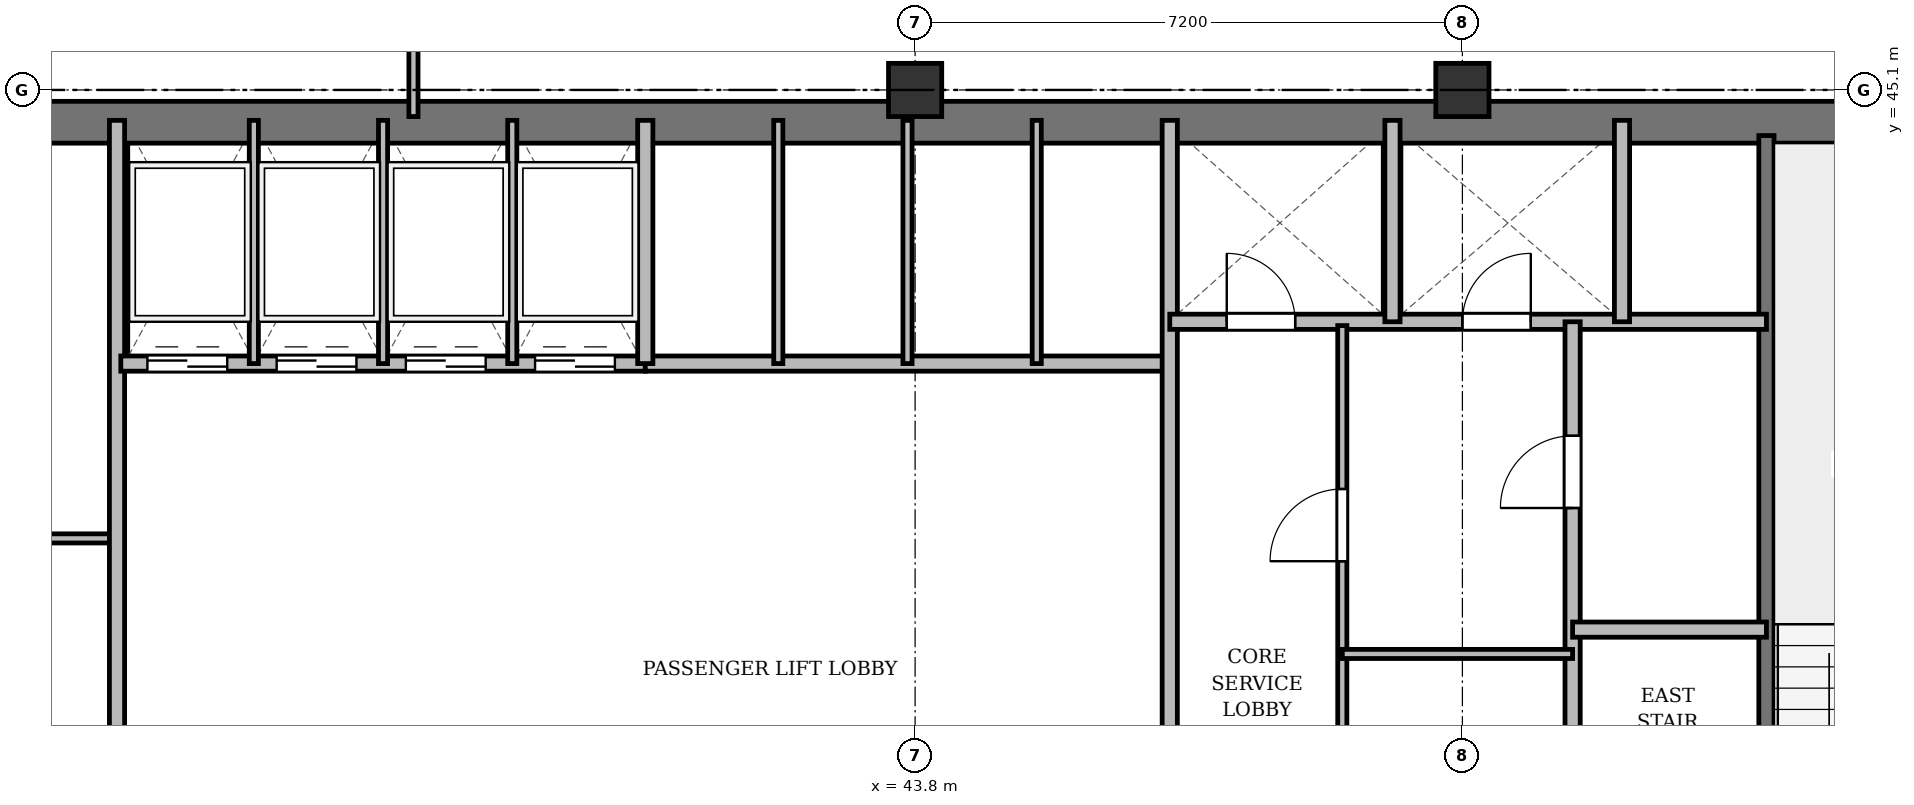
"""IFC4 building model, lengths in metres.
Left out: names, types, materials, properties, quantities, classifications, styles, units other than length and angle.
Written with IfcOpenShell. Run it as: python <this file> out.ifc"""

import sys

from ifc_helpers import new_model, si_unit, direction, frame, frame_2d, origin, origin_2d, place, context, subcontext, project, spatial, rectangle, extrude, source, transform, mapped, element, fill, save


model = new_model("IFC4")
c1 = context("Model", 3, precision=1e-05, world=origin(), true_north=direction((0.0, 1.0)))
c2 = subcontext(c1, "Body", "Model", "MODEL_VIEW")
j1 = project(units=[si_unit("LENGTHUNIT", "METRE"), si_unit("PLANEANGLEUNIT", "RADIAN")], contexts=[c1])
p1 = place(None, origin())
s1 = spatial("IfcSite", under=j1, at=p1, CompositionType="ELEMENT")
p2 = place(p1, origin())
s2 = spatial("IfcBuilding", under=s1, at=p2, CompositionType="ELEMENT")
p3 = place(p2, frame((0.0, 0.0, 160.9)))
s3 = spatial("IfcBuildingStorey", under=s2, at=p3, CompositionType="ELEMENT", Elevation=160.9)
m1 = source(origin(), c2, "Body", "SweptSolid", [
    extrude(rectangle(XDim=0.7, YDim=0.7, at=origin_2d()), origin(), (0.0, 0.0, 1.0), 3.6),
])
for number, where, z_axis, x_axis in (
    (1, (43.8, 45.1, 0.0), (0.0, 0.0, 1.0), (1.0, 0.0, 0.0)),
    (2, (51.0, 45.1, 0.0), (0.0, 0.0, 1.0), (1.0, 0.0, 0.0)),
):
    element("IfcColumn", number, at=place(p3, frame(where, z_axis=z_axis, x_axis=x_axis)), inside=s3, PredefinedType="COLUMN", context=c2, shape_type="MappedRepresentation", body=[
        mapped(m1, transform((0.0, 0.0, 0.0), x_axis=(1.0, 0.0, 0.0), y_axis=(0.0, 1.0, 0.0), z_axis=(0.0, 0.0, 1.0), scale=1.0)),
    ])
p4 = place(p3, frame((15.65, 44.675, 0.0), z_axis=(0.0, 0.0, 1.0), x_axis=(1.0, 0.0, 0.0)))
e3 = element("IfcWall", 3, at=p4, inside=s3, PredefinedType="SHEAR", context=c2, shape_type="SweptSolid", body=[
    extrude(rectangle(XDim=43.1, YDim=0.55, at=frame_2d((21.55, 0.0))), origin(), (0.0, 0.0, 1.0), 3.35),
])
p5 = place(p3, frame((55.0, 33.4, 0.0), z_axis=(0.0, 0.0, 1.0), x_axis=(0.0, 1.0, 0.0)))
e4 = element("IfcWall", 4, at=p5, inside=s3, PredefinedType="SHEAR", context=c2, shape_type="SweptSolid", body=[
    extrude(rectangle(XDim=11.1, YDim=0.2, at=frame_2d((5.55, 0.0))), origin(), (0.0, 0.0, 1.0), 3.35),
])
p6 = place(p5, frame((0.85, 0.0, 0.0)))
e5 = element("IfcOpeningElement", 5, at=p6, cuts=e4, PredefinedType="OPENING", context=c2, shape_type="SweptSolid", body=[
    extrude(rectangle(XDim=1.1, YDim=2.15, at=frame_2d((0.55, 1.075))), frame((0.0, 0.11, 0.0), z_axis=(0.0, -1.0, 0.0), x_axis=(1.0, 0.0, 0.0)), (0.0, 0.0, 1.0), 0.22),
])
p7 = place(p3, frame((26.3, 39.2, 0.0), z_axis=(0.0, 0.0, 1.0), x_axis=(1.0, 0.0, 0.0)))
e6 = element("IfcWall", 6, at=p7, inside=s3, PredefinedType="PARTITIONING", context=c2, shape_type="SweptSolid", body=[
    extrude(rectangle(XDim=7.0, YDim=0.12, at=frame_2d((3.5, 0.0))), origin(), (0.0, 0.0, 1.0), 2.85),
])
p8 = place(p7, frame((2.6, 0.0, 0.0)))
e7 = element("IfcOpeningElement", 7, at=p8, cuts=e6, PredefinedType="OPENING", context=c2, shape_type="SweptSolid", body=[
    extrude(rectangle(XDim=0.95, YDim=2.15, at=frame_2d((0.475, 1.075))), frame((0.0, 0.07, 0.0), z_axis=(0.0, -1.0, 0.0), x_axis=(1.0, 0.0, 0.0)), (0.0, 0.0, 1.0), 0.14),
])
p9 = place(p3, frame((33.3, 33.4, 0.0), z_axis=(0.0, 0.0, 1.0), x_axis=(0.0, 1.0, 0.0)))
e8 = element("IfcWall", 8, at=p9, inside=s3, PredefinedType="SOLIDWALL", context=c2, shape_type="SweptSolid", body=[
    extrude(rectangle(XDim=11.3, YDim=0.2, at=frame_2d((5.65, 0.0))), origin(), (0.0, 0.0, 1.0), 2.75),
])
p10 = place(p3, frame((33.35, 41.5, 0.0), z_axis=(0.0, 0.0, 1.0), x_axis=(1.0, 0.0, 0.0)))
e9 = element("IfcWall", 9, at=p10, inside=s3, PredefinedType="SOLIDWALL", context=c2, shape_type="SweptSolid", body=[
    extrude(rectangle(XDim=6.9, YDim=0.2, at=frame_2d((3.45, 0.0))), origin(), (0.0, 0.0, 1.0), 3.35),
])
p11 = place(p10, frame((0.35, 0.0, 0.0)))
e10 = element("IfcOpeningElement", 10, at=p11, cuts=e9, PredefinedType="OPENING", context=c2, shape_type="SweptSolid", body=[
    extrude(rectangle(XDim=1.05, YDim=2.15, at=frame_2d((0.525, 1.075))), frame((0.0, 0.11, 0.0), z_axis=(0.0, -1.0, 0.0), x_axis=(1.0, 0.0, 0.0)), (0.0, 0.0, 1.0), 0.22),
])
p12 = place(p10, frame((2.05, 0.0, 0.0)))
e11 = element("IfcOpeningElement", 11, at=p12, cuts=e9, PredefinedType="OPENING", context=c2, shape_type="SweptSolid", body=[
    extrude(rectangle(XDim=1.05, YDim=2.15, at=frame_2d((0.525, 1.075))), frame((0.0, 0.11, 0.0), z_axis=(0.0, -1.0, 0.0), x_axis=(1.0, 0.0, 0.0)), (0.0, 0.0, 1.0), 0.22),
])
p13 = place(p10, frame((3.75, 0.0, 0.0)))
e12 = element("IfcOpeningElement", 12, at=p13, cuts=e9, PredefinedType="OPENING", context=c2, shape_type="SweptSolid", body=[
    extrude(rectangle(XDim=1.05, YDim=2.15, at=frame_2d((0.525, 1.075))), frame((0.0, 0.11, 0.0), z_axis=(0.0, -1.0, 0.0), x_axis=(1.0, 0.0, 0.0)), (0.0, 0.0, 1.0), 0.22),
])
p14 = place(p10, frame((5.45, 0.0, 0.0)))
e13 = element("IfcOpeningElement", 13, at=p14, cuts=e9, PredefinedType="OPENING", context=c2, shape_type="SweptSolid", body=[
    extrude(rectangle(XDim=1.05, YDim=2.15, at=frame_2d((0.525, 1.075))), frame((0.0, 0.11, 0.0), z_axis=(0.0, -1.0, 0.0), x_axis=(1.0, 0.0, 0.0)), (0.0, 0.0, 1.0), 0.22),
])
for number, where, z_axis, x_axis in (
    (14, (35.1, 41.5, 0.0), (0.0, 0.0, 1.0), (0.0, 1.0, 0.0)),
    (15, (36.8, 41.5, 0.0), (0.0, 0.0, 1.0), (0.0, 1.0, 0.0)),
    (16, (38.5, 41.5, 0.0), (0.0, 0.0, 1.0), (0.0, 1.0, 0.0)),
):
    element("IfcWall", number, at=place(p3, frame(where, z_axis=z_axis, x_axis=x_axis)), inside=s3, PredefinedType="PARTITIONING", context=c2, shape_type="SweptSolid", body=[
        extrude(rectangle(XDim=3.2, YDim=0.12, at=frame_2d((1.6, 0.0))), origin(), (0.0, 0.0, 1.0), 3.35),
    ])
p15 = place(p3, frame((40.25, 41.5, 0.0), z_axis=(0.0, 0.0, 1.0), x_axis=(1.0, 0.0, 0.0)))
e17 = element("IfcWall", 17, at=p15, inside=s3, PredefinedType="SOLIDWALL", context=c2, shape_type="SweptSolid", body=[
    extrude(rectangle(XDim=6.9, YDim=0.2, at=frame_2d((3.45, 0.0))), origin(), (0.0, 0.0, 1.0), 2.85),
])
p16 = place(p3, frame((40.25, 41.5, 0.0), z_axis=(0.0, 0.0, 1.0), x_axis=(0.0, 1.0, 0.0)))
e18 = element("IfcWall", 18, at=p16, inside=s3, PredefinedType="SOLIDWALL", context=c2, shape_type="SweptSolid", body=[
    extrude(rectangle(XDim=3.2, YDim=0.2, at=frame_2d((1.6, 0.0))), origin(), (0.0, 0.0, 1.0), 3.35),
])
p17 = place(p3, frame((42.0, 41.5, 0.0), z_axis=(0.0, 0.0, 1.0), x_axis=(0.0, 1.0, 0.0)))
e19 = element("IfcWall", 19, at=p17, inside=s3, PredefinedType="PARTITIONING", context=c2, shape_type="SweptSolid", body=[
    extrude(rectangle(XDim=3.2, YDim=0.12, at=frame_2d((1.6, 0.0))), origin(), (0.0, 0.0, 1.0), 3.35),
])
p18 = place(p3, frame((43.7, 41.5, 0.0), z_axis=(0.0, 0.0, 1.0), x_axis=(0.0, 1.0, 0.0)))
e20 = element("IfcWall", 20, at=p18, inside=s3, PredefinedType="PARTITIONING", context=c2, shape_type="SweptSolid", body=[
    extrude(rectangle(XDim=3.2, YDim=0.12, at=frame_2d((1.6, 0.0))), origin(), (0.0, 0.0, 1.0), 2.85),
])
p19 = place(p3, frame((45.4, 41.5, 0.0), z_axis=(0.0, 0.0, 1.0), x_axis=(0.0, 1.0, 0.0)))
e21 = element("IfcWall", 21, at=p19, inside=s3, PredefinedType="PARTITIONING", context=c2, shape_type="SweptSolid", body=[
    extrude(rectangle(XDim=3.2, YDim=0.12, at=frame_2d((1.6, 0.0))), origin(), (0.0, 0.0, 1.0), 3.35),
])
p20 = place(p3, frame((47.15, 33.4, 0.0), z_axis=(0.0, 0.0, 1.0), x_axis=(0.0, 1.0, 0.0)))
e22 = element("IfcWall", 22, at=p20, inside=s3, PredefinedType="SOLIDWALL", context=c2, shape_type="SweptSolid", body=[
    extrude(rectangle(XDim=11.3, YDim=0.2, at=frame_2d((5.65, 0.0))), origin(), (0.0, 0.0, 1.0), 2.75),
])
p21 = place(p3, frame((47.15, 42.05, 0.0), z_axis=(0.0, 0.0, 1.0), x_axis=(1.0, 0.0, 0.0)))
e23 = element("IfcWall", 23, at=p21, inside=s3, PredefinedType="SOLIDWALL", context=c2, shape_type="SweptSolid", body=[
    extrude(rectangle(XDim=7.85, YDim=0.2, at=frame_2d((3.925, 0.0))), origin(), (0.0, 0.0, 1.0), 2.85),
])
p22 = place(p21, frame((0.75, 0.0, 0.0)))
e24 = element("IfcOpeningElement", 24, at=p22, cuts=e23, PredefinedType="OPENING", context=c2, shape_type="SweptSolid", body=[
    extrude(rectangle(XDim=0.9, YDim=2.1, at=frame_2d((0.45, 1.05))), frame((0.0, 0.11, 0.0), z_axis=(0.0, -1.0, 0.0), x_axis=(1.0, 0.0, 0.0)), (0.0, 0.0, 1.0), 0.22),
])
p23 = place(p21, frame((3.85, 0.0, 0.0)))
e25 = element("IfcOpeningElement", 25, at=p23, cuts=e23, PredefinedType="OPENING", context=c2, shape_type="SweptSolid", body=[
    extrude(rectangle(XDim=0.9, YDim=2.1, at=frame_2d((0.45, 1.05))), frame((0.0, 0.11, 0.0), z_axis=(0.0, -1.0, 0.0), x_axis=(1.0, 0.0, 0.0)), (0.0, 0.0, 1.0), 0.22),
])
for number, where, z_axis, x_axis in (
    (26, (50.08, 42.05, 0.0), (0.0, 0.0, 1.0), (0.0, 1.0, 0.0)),
    (27, (53.1, 42.05, 0.0), (0.0, 0.0, 1.0), (0.0, 1.0, 0.0)),
):
    element("IfcWall", number, at=place(p3, frame(where, z_axis=z_axis, x_axis=x_axis)), inside=s3, PredefinedType="SOLIDWALL", context=c2, shape_type="SweptSolid", body=[
        extrude(rectangle(XDim=2.65, YDim=0.2, at=frame_2d((1.325, 0.0))), origin(), (0.0, 0.0, 1.0), 3.35),
    ])
p24 = place(p3, frame((52.45, 33.4, 0.0), z_axis=(0.0, 0.0, 1.0), x_axis=(0.0, 1.0, 0.0)))
e28 = element("IfcWall", 28, at=p24, inside=s3, PredefinedType="PARTITIONING", context=c2, shape_type="SweptSolid", body=[
    extrude(rectangle(XDim=8.65, YDim=0.2, at=frame_2d((4.325, 0.0))), origin(), (0.0, 0.0, 1.0), 2.75),
])
p25 = place(p24, frame((6.2, 0.0, 0.0)))
e29 = element("IfcOpeningElement", 29, at=p25, cuts=e28, PredefinedType="OPENING", context=c2, shape_type="SweptSolid", body=[
    extrude(rectangle(XDim=0.95, YDim=2.15, at=frame_2d((0.475, 1.075))), frame((0.0, 0.11, 0.0), z_axis=(0.0, -1.0, 0.0), x_axis=(1.0, 0.0, 0.0)), (0.0, 0.0, 1.0), 0.22),
])
p26 = place(p3, frame((52.45, 38.0, 0.0), z_axis=(0.0, 0.0, 1.0), x_axis=(1.0, 0.0, 0.0)))
e30 = element("IfcWall", 30, at=p26, inside=s3, PredefinedType="PARTITIONING", context=c2, shape_type="SweptSolid", body=[
    extrude(rectangle(XDim=2.55, YDim=0.2, at=frame_2d((1.275, 0.0))), origin(), (0.0, 0.0, 1.0), 3.35),
])
p27 = place(p3, frame((49.42, 33.4, 0.0), z_axis=(0.0, 0.0, 1.0), x_axis=(0.0, 1.0, 0.0)))
e31 = element("IfcWall", 31, at=p27, inside=s3, PredefinedType="PARTITIONING", context=c2, shape_type="SweptSolid", body=[
    extrude(rectangle(XDim=8.6, YDim=0.12, at=frame_2d((4.3, 0.0))), origin(), (0.0, 0.0, 1.0), 2.75),
])
p28 = place(p27, frame((1.3, 0.0, 0.0)))
e32 = element("IfcOpeningElement", 32, at=p28, cuts=e31, PredefinedType="OPENING", context=c2, shape_type="SweptSolid", body=[
    extrude(rectangle(XDim=0.95, YDim=2.15, at=frame_2d((0.475, 1.075))), frame((0.0, 0.07, 0.0), z_axis=(0.0, -1.0, 0.0), x_axis=(1.0, 0.0, 0.0)), (0.0, 0.0, 1.0), 0.14),
])
p29 = place(p27, frame((5.5, 0.0, 0.0)))
e33 = element("IfcOpeningElement", 33, at=p29, cuts=e31, PredefinedType="OPENING", context=c2, shape_type="SweptSolid", body=[
    extrude(rectangle(XDim=0.95, YDim=2.15, at=frame_2d((0.475, 1.075))), frame((0.0, 0.07, 0.0), z_axis=(0.0, -1.0, 0.0), x_axis=(1.0, 0.0, 0.0)), (0.0, 0.0, 1.0), 0.14),
])
p30 = place(p3, frame((49.42, 37.68, 0.0), z_axis=(0.0, 0.0, 1.0), x_axis=(1.0, 0.0, 0.0)))
e34 = element("IfcWall", 34, at=p30, inside=s3, PredefinedType="PARTITIONING", context=c2, shape_type="SweptSolid", body=[
    extrude(rectangle(XDim=3.03, YDim=0.12, at=frame_2d((1.515, 0.0))), origin(), (0.0, 0.0, 1.0), 2.85),
])
p31 = place(p3, frame((37.2, 44.75, 0.0), z_axis=(0.0, 0.0, 1.0), x_axis=(0.0, 1.0, 0.0)))
e35 = element("IfcWall", 35, at=p31, inside=s3, PredefinedType="PARTITIONING", context=c2, shape_type="SweptSolid", body=[
    extrude(rectangle(XDim=3.61, YDim=0.12, at=frame_2d((1.805, 0.0))), origin(), (0.0, 0.0, 1.0), 2.75),
])
p32 = place(p31, frame((1.1, 0.0, 0.0)))
e36 = element("IfcOpeningElement", 36, at=p32, cuts=e35, PredefinedType="OPENING", context=c2, shape_type="SweptSolid", body=[
    extrude(rectangle(XDim=0.95, YDim=2.15, at=frame_2d((0.475, 1.075))), frame((0.0, 0.07, 0.0), z_axis=(0.0, -1.0, 0.0), x_axis=(1.0, 0.0, 0.0)), (0.0, 0.0, 1.0), 0.14),
])
m2 = source(origin(), c2, "Body", "SweptSolid", [
    extrude(rectangle(XDim=1.05, YDim=2.15, at=frame_2d((0.525, 1.075))), frame((0.0, 0.025, 0.0), z_axis=(0.0, -1.0, 0.0), x_axis=(1.0, 0.0, 0.0)), (0.0, 0.0, 1.0), 0.05),
])
p33 = place(p11, origin())
e37 = element("IfcDoor", 37, at=p33, inside=s3, OperationType="DOUBLE_DOOR_SLIDING", PredefinedType="DOOR", context=c2, shape_type="MappedRepresentation", body=[
    mapped(m2, transform((0.0, 0.0, 0.0), x_axis=(1.0, 0.0, 0.0), y_axis=(0.0, 1.0, 0.0), z_axis=(0.0, 0.0, 1.0), scale=1.0)),
])
fill(e10, e37)
p34 = place(p12, origin())
e38 = element("IfcDoor", 38, at=p34, inside=s3, OperationType="DOUBLE_DOOR_SLIDING", PredefinedType="DOOR", context=c2, shape_type="MappedRepresentation", body=[
    mapped(m2, transform((0.0, 0.0, 0.0), x_axis=(1.0, 0.0, 0.0), y_axis=(0.0, 1.0, 0.0), z_axis=(0.0, 0.0, 1.0), scale=1.0)),
])
fill(e11, e38)
p35 = place(p13, origin())
e39 = element("IfcDoor", 39, at=p35, inside=s3, OperationType="DOUBLE_DOOR_SLIDING", PredefinedType="DOOR", context=c2, shape_type="MappedRepresentation", body=[
    mapped(m2, transform((0.0, 0.0, 0.0), x_axis=(1.0, 0.0, 0.0), y_axis=(0.0, 1.0, 0.0), z_axis=(0.0, 0.0, 1.0), scale=1.0)),
])
fill(e12, e39)
p36 = place(p14, origin())
e40 = element("IfcDoor", 40, at=p36, inside=s3, OperationType="DOUBLE_DOOR_SLIDING", PredefinedType="DOOR", context=c2, shape_type="MappedRepresentation", body=[
    mapped(m2, transform((0.0, 0.0, 0.0), x_axis=(1.0, 0.0, 0.0), y_axis=(0.0, 1.0, 0.0), z_axis=(0.0, 0.0, 1.0), scale=1.0)),
])
fill(e13, e40)
m3 = source(origin(), c2, "Body", "SweptSolid", [
    extrude(rectangle(XDim=0.9, YDim=2.1, at=frame_2d((0.45, 1.05))), frame((0.0, 0.025, 0.0), z_axis=(0.0, -1.0, 0.0), x_axis=(1.0, 0.0, 0.0)), (0.0, 0.0, 1.0), 0.05),
])
p37 = place(p22, origin())
e41 = element("IfcDoor", 41, at=p37, inside=s3, OperationType="SINGLE_SWING_LEFT", PredefinedType="DOOR", context=c2, shape_type="MappedRepresentation", body=[
    mapped(m3, transform((0.0, 0.0, 0.0), x_axis=(1.0, 0.0, 0.0), y_axis=(0.0, 1.0, 0.0), z_axis=(0.0, 0.0, 1.0), scale=1.0)),
])
fill(e24, e41)
p38 = place(p23, origin())
e42 = element("IfcDoor", 42, at=p38, inside=s3, OperationType="SINGLE_SWING_RIGHT", PredefinedType="DOOR", context=c2, shape_type="MappedRepresentation", body=[
    mapped(m3, transform((0.0, 0.0, 0.0), x_axis=(1.0, 0.0, 0.0), y_axis=(0.0, 1.0, 0.0), z_axis=(0.0, 0.0, 1.0), scale=1.0)),
])
fill(e25, e42)
m4 = source(origin(), c2, "Body", "SweptSolid", [
    extrude(rectangle(XDim=0.95, YDim=2.15, at=frame_2d((0.475, 1.075))), frame((0.0, 0.025, 0.0), z_axis=(0.0, -1.0, 0.0), x_axis=(1.0, 0.0, 0.0)), (0.0, 0.0, 1.0), 0.05),
])
p39 = place(p25, origin())
e43 = element("IfcDoor", 43, at=p39, inside=s3, OperationType="SINGLE_SWING_LEFT", PredefinedType="DOOR", context=c2, shape_type="MappedRepresentation", body=[
    mapped(m4, transform((0.0, 0.0, 0.0), x_axis=(1.0, 0.0, 0.0), y_axis=(0.0, 1.0, 0.0), z_axis=(0.0, 0.0, 1.0), scale=1.0)),
])
fill(e29, e43)
p40 = place(p29, origin())
e44 = element("IfcDoor", 44, at=p40, inside=s3, OperationType="SINGLE_SWING_LEFT", PredefinedType="DOOR", context=c2, shape_type="MappedRepresentation", body=[
    mapped(m4, transform((0.0, 0.0, 0.0), x_axis=(1.0, 0.0, 0.0), y_axis=(0.0, 1.0, 0.0), z_axis=(0.0, 0.0, 1.0), scale=1.0)),
])
fill(e33, e44)
save(model, sys.argv[1])
